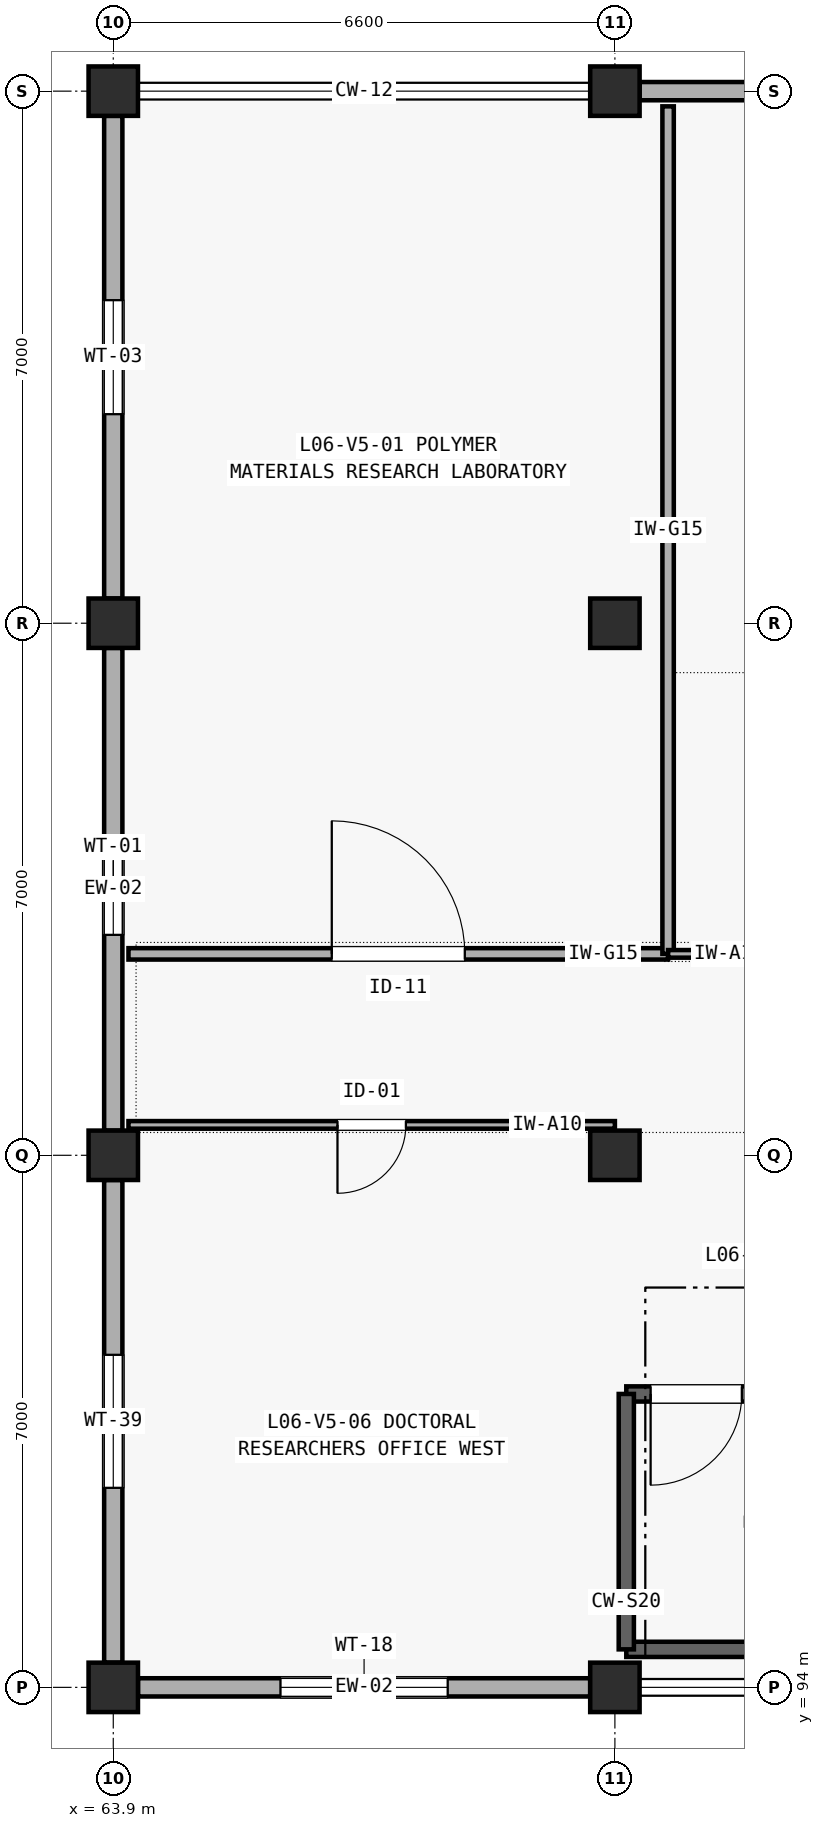
"""IFC4 building model, lengths in metres.
Left out: names, types, materials, properties, quantities, classifications, styles, units other than length and angle.
Written with IfcOpenShell. Run it as: python <this file> out.ifc"""

import sys

from ifc_helpers import new_model, si_unit, direction, frame, frame_2d, origin, origin_2d, place, context, subcontext, project, spatial, rectangle, extrude, element, fill, save


model = new_model("IFC4")
c1 = context("Model", 3, precision=1e-05, world=origin(), true_north=direction((0.0, 1.0)))
c2 = subcontext(c1, "Body", "Model", "MODEL_VIEW")
j1 = project(units=[si_unit("LENGTHUNIT", "METRE"), si_unit("PLANEANGLEUNIT", "RADIAN")], contexts=[c1])
p1 = place(None, origin())
s1 = spatial("IfcSite", under=j1, at=p1, CompositionType="ELEMENT")
p2 = place(p1, origin())
s2 = spatial("IfcBuilding", under=s1, at=p2, CompositionType="ELEMENT")
p3 = place(p2, frame((0.0, 0.0, 25.2)))
s3 = spatial("IfcBuildingStorey", under=s2, at=p3, CompositionType="ELEMENT", Elevation=25.2)
for number, where, z_axis, x_axis in (
    (1, (63.9, 94.0, 0.0), (0.0, 0.0, 1.0), (1.0, 0.0, 0.0)),
    (2, (63.9, 101.0, 0.0), (0.0, 0.0, 1.0), (1.0, 0.0, 0.0)),
    (3, (63.9, 108.0, 0.0), (0.0, 0.0, 1.0), (1.0, 0.0, 0.0)),
    (4, (63.9, 115.0, 0.0), (0.0, 0.0, 1.0), (1.0, 0.0, 0.0)),
    (5, (70.5, 94.0, 0.0), (0.0, 0.0, 1.0), (1.0, 0.0, 0.0)),
    (6, (70.5, 101.0, 0.0), (0.0, 0.0, 1.0), (1.0, 0.0, 0.0)),
    (7, (70.5, 108.0, 0.0), (0.0, 0.0, 1.0), (1.0, 0.0, 0.0)),
    (8, (70.5, 115.0, 0.0), (0.0, 0.0, 1.0), (1.0, 0.0, 0.0)),
):
    element("IfcColumn", number, at=place(p3, frame(where, z_axis=z_axis, x_axis=x_axis)), inside=s3, PredefinedType="COLUMN", context=c2, shape_type="SweptSolid", body=[
        extrude(rectangle(XDim=0.65, YDim=0.65, at=origin_2d()), origin(), (0.0, 0.0, 1.0), 4.2),
    ])
p4 = place(p3, frame((64.225, 94.0, 0.0), z_axis=(0.0, 0.0, 1.0), x_axis=(1.0, 0.0, 0.0)))
e9 = element("IfcWall", 9, at=p4, inside=s3, PredefinedType="SOLIDWALL", context=c2, shape_type="SweptSolid", body=[
    extrude(rectangle(XDim=5.95, YDim=0.24, at=frame_2d((2.975, 0.0))), origin(), (0.0, 0.0, 1.0), 3.345),
])
p5 = place(p4, frame((1.875, 0.0, 0.85)))
e10 = element("IfcOpeningElement", 10, at=p5, cuts=e9, PredefinedType="OPENING", context=c2, shape_type="SweptSolid", body=[
    extrude(rectangle(XDim=2.2, YDim=1.25, at=frame_2d((1.1, 0.625))), frame((0.0, 0.13, 0.0), z_axis=(0.0, -1.0, 0.0), x_axis=(1.0, 0.0, 0.0)), (0.0, 0.0, 1.0), 0.26),
])
p6 = place(p3, frame((70.825, 115.0, 0.0), z_axis=(0.0, 0.0, 1.0), x_axis=(1.0, 0.0, 0.0)))
e11 = element("IfcWall", 11, at=p6, inside=s3, PredefinedType="SOLIDWALL", context=c2, shape_type="SweptSolid", body=[
    extrude(rectangle(XDim=5.95, YDim=0.24, at=frame_2d((2.975, 0.0))), origin(), (0.0, 0.0, 1.0), 3.345),
])
p7 = place(p6, frame((2.025, 0.0, 0.85)))
e12 = element("IfcOpeningElement", 12, at=p7, cuts=e11, PredefinedType="OPENING", context=c2, shape_type="SweptSolid", body=[
    extrude(rectangle(XDim=1.9, YDim=1.45, at=frame_2d((0.95, 0.725))), frame((0.0, 0.13, 0.0), z_axis=(0.0, -1.0, 0.0), x_axis=(1.0, 0.0, 0.0)), (0.0, 0.0, 1.0), 0.26),
])
p8 = place(p3, frame((63.9, 94.325, 0.0), z_axis=(0.0, 0.0, 1.0), x_axis=(0.0, 1.0, 0.0)))
e13 = element("IfcWall", 13, at=p8, inside=s3, PredefinedType="SOLIDWALL", context=c2, shape_type="SweptSolid", body=[
    extrude(rectangle(XDim=6.35, YDim=0.24, at=frame_2d((3.175, 0.0))), origin(), (0.0, 0.0, 1.0), 3.465),
])
p9 = place(p8, frame((2.3, 0.0, 0.85)))
e14 = element("IfcOpeningElement", 14, at=p9, cuts=e13, PredefinedType="OPENING", context=c2, shape_type="SweptSolid", body=[
    extrude(rectangle(XDim=1.75, YDim=1.55, at=frame_2d((0.875, 0.775))), frame((0.0, 0.13, 0.0), z_axis=(0.0, -1.0, 0.0), x_axis=(1.0, 0.0, 0.0)), (0.0, 0.0, 1.0), 0.26),
])
p10 = place(p3, frame((63.9, 101.325, 0.0), z_axis=(0.0, 0.0, 1.0), x_axis=(0.0, 1.0, 0.0)))
e15 = element("IfcWall", 15, at=p10, inside=s3, PredefinedType="SOLIDWALL", context=c2, shape_type="SweptSolid", body=[
    extrude(rectangle(XDim=6.35, YDim=0.24, at=frame_2d((3.175, 0.0))), origin(), (0.0, 0.0, 1.0), 3.465),
])
p11 = place(p10, frame((2.575, 0.0, 0.85)))
e16 = element("IfcOpeningElement", 16, at=p11, cuts=e15, PredefinedType="OPENING", context=c2, shape_type="SweptSolid", body=[
    extrude(rectangle(XDim=1.2, YDim=1.35, at=frame_2d((0.6, 0.675))), frame((0.0, 0.13, 0.0), z_axis=(0.0, -1.0, 0.0), x_axis=(1.0, 0.0, 0.0)), (0.0, 0.0, 1.0), 0.26),
])
p12 = place(p3, frame((63.9, 108.325, 0.0), z_axis=(0.0, 0.0, 1.0), x_axis=(0.0, 1.0, 0.0)))
e17 = element("IfcWall", 17, at=p12, inside=s3, PredefinedType="SOLIDWALL", context=c2, shape_type="SweptSolid", body=[
    extrude(rectangle(XDim=6.35, YDim=0.24, at=frame_2d((3.175, 0.0))), origin(), (0.0, 0.0, 1.0), 3.465),
])
p13 = place(p12, frame((2.425, 0.0, 0.85)))
e18 = element("IfcOpeningElement", 18, at=p13, cuts=e17, PredefinedType="OPENING", context=c2, shape_type="SweptSolid", body=[
    extrude(rectangle(XDim=1.5, YDim=1.35, at=frame_2d((0.75, 0.675))), frame((0.0, 0.13, 0.0), z_axis=(0.0, -1.0, 0.0), x_axis=(1.0, 0.0, 0.0)), (0.0, 0.0, 1.0), 0.26),
])
p14 = place(p3, frame((70.65, 94.5, 0.0), z_axis=(0.0, 0.0, 1.0), x_axis=(1.0, 0.0, 0.0)))
e19 = element("IfcWall", 19, at=p14, inside=s3, PredefinedType="SHEAR", context=c2, shape_type="SweptSolid", body=[
    extrude(rectangle(XDim=6.3, YDim=0.2, at=frame_2d((3.15, 0.0))), origin(), (0.0, 0.0, 1.0), 4.2),
])
p15 = place(p3, frame((70.65, 97.86, 0.0), z_axis=(0.0, 0.0, 1.0), x_axis=(1.0, 0.0, 0.0)))
e20 = element("IfcWall", 20, at=p15, inside=s3, PredefinedType="SHEAR", context=c2, shape_type="SweptSolid", body=[
    extrude(rectangle(XDim=6.3, YDim=0.2, at=frame_2d((3.15, 0.0))), origin(), (0.0, 0.0, 1.0), 4.2),
])
p16 = place(p15, frame((0.32, 0.0, 0.0)))
e21 = element("IfcOpeningElement", 21, at=p16, cuts=e20, PredefinedType="OPENING", context=c2, shape_type="SweptSolid", body=[
    extrude(rectangle(XDim=1.2, YDim=2.15, at=frame_2d((0.6, 1.075))), frame((0.0, 0.11, 0.0), z_axis=(0.0, -1.0, 0.0), x_axis=(1.0, 0.0, 0.0)), (0.0, 0.0, 1.0), 0.22),
])
p17 = place(p3, frame((70.65, 94.5, 0.0), z_axis=(0.0, 0.0, 1.0), x_axis=(0.0, 1.0, 0.0)))
e22 = element("IfcWall", 22, at=p17, inside=s3, PredefinedType="SHEAR", context=c2, shape_type="SweptSolid", body=[
    extrude(rectangle(XDim=3.36, YDim=0.2, at=frame_2d((1.68, 0.0))), origin(), (0.0, 0.0, 1.0), 4.2),
])
p18 = place(p3, frame((64.1, 103.65, 0.0), z_axis=(0.0, 0.0, 1.0), x_axis=(1.0, 0.0, 0.0)))
e23 = element("IfcWall", 23, at=p18, inside=s3, PredefinedType="PARTITIONING", context=c2, shape_type="SweptSolid", body=[
    extrude(rectangle(XDim=7.1, YDim=0.15, at=frame_2d((3.55, 0.0))), origin(), (0.0, 0.0, 1.0), 3.9),
])
p19 = place(p18, frame((2.675, 0.0, 0.0)))
e24 = element("IfcOpeningElement", 24, at=p19, cuts=e23, PredefinedType="OPENING", context=c2, shape_type="SweptSolid", body=[
    extrude(rectangle(XDim=1.75, YDim=2.25, at=frame_2d((0.875, 1.125))), frame((0.0, 0.085, 0.0), z_axis=(0.0, -1.0, 0.0), x_axis=(1.0, 0.0, 0.0)), (0.0, 0.0, 1.0), 0.17),
])
p20 = place(p3, frame((71.2, 103.65, 0.0), z_axis=(0.0, 0.0, 1.0), x_axis=(0.0, 1.0, 0.0)))
e25 = element("IfcWall", 25, at=p20, inside=s3, PredefinedType="PARTITIONING", context=c2, shape_type="SweptSolid", body=[
    extrude(rectangle(XDim=11.15, YDim=0.15, at=frame_2d((5.575, 0.0))), origin(), (0.0, 0.0, 1.0), 3.9),
])
p21 = place(p3, frame((71.2, 103.65, 0.0), z_axis=(0.0, 0.0, 1.0), x_axis=(1.0, 0.0, 0.0)))
e26 = element("IfcWall", 26, at=p21, inside=s3, PredefinedType="PARTITIONING", context=c2, shape_type="SweptSolid", body=[
    extrude(rectangle(XDim=7.0, YDim=0.1, at=frame_2d((3.5, 0.0))), origin(), (0.0, 0.0, 1.0), 3.9),
])
p22 = place(p21, frame((2.575, 0.0, 0.0)))
e27 = element("IfcOpeningElement", 27, at=p22, cuts=e26, PredefinedType="OPENING", context=c2, shape_type="SweptSolid", body=[
    extrude(rectangle(XDim=1.85, YDim=2.3, at=frame_2d((0.925, 1.15))), frame((0.0, 0.06, 0.0), z_axis=(0.0, -1.0, 0.0), x_axis=(1.0, 0.0, 0.0)), (0.0, 0.0, 1.0), 0.12),
])
p23 = place(p3, frame((64.1, 101.4, 0.0), z_axis=(0.0, 0.0, 1.0), x_axis=(1.0, 0.0, 0.0)))
e28 = element("IfcWall", 28, at=p23, inside=s3, PredefinedType="PARTITIONING", context=c2, shape_type="SweptSolid", body=[
    extrude(rectangle(XDim=6.4, YDim=0.1, at=frame_2d((3.2, 0.0))), origin(), (0.0, 0.0, 1.0), 3.9),
])
p24 = place(p23, frame((2.75, 0.0, 0.0)))
e29 = element("IfcOpeningElement", 29, at=p24, cuts=e28, PredefinedType="OPENING", context=c2, shape_type="SweptSolid", body=[
    extrude(rectangle(XDim=0.9, YDim=2.1, at=frame_2d((0.45, 1.05))), frame((0.0, 0.06, 0.0), z_axis=(0.0, -1.0, 0.0), x_axis=(1.0, 0.0, 0.0)), (0.0, 0.0, 1.0), 0.12),
])
p25 = place(p5, origin())
e30 = element("IfcWindow", 30, at=p25, inside=s3, PartitioningType="SINGLE_PANEL", PredefinedType="WINDOW", context=c2, shape_type="SweptSolid", body=[
    extrude(rectangle(XDim=2.2, YDim=1.25, at=frame_2d((1.1, 0.625))), frame((0.0, 0.03, 0.0), z_axis=(0.0, -1.0, 0.0), x_axis=(1.0, 0.0, 0.0)), (0.0, 0.0, 1.0), 0.06),
])
fill(e10, e30)
p26 = place(p9, origin())
e31 = element("IfcWindow", 31, at=p26, inside=s3, PartitioningType="SINGLE_PANEL", PredefinedType="WINDOW", context=c2, shape_type="SweptSolid", body=[
    extrude(rectangle(XDim=1.75, YDim=1.55, at=frame_2d((0.875, 0.775))), frame((0.0, 0.03, 0.0), z_axis=(0.0, -1.0, 0.0), x_axis=(1.0, 0.0, 0.0)), (0.0, 0.0, 1.0), 0.06),
])
fill(e14, e31)
p27 = place(p11, origin())
e32 = element("IfcWindow", 32, at=p27, inside=s3, PartitioningType="SINGLE_PANEL", PredefinedType="WINDOW", context=c2, shape_type="SweptSolid", body=[
    extrude(rectangle(XDim=1.2, YDim=1.35, at=frame_2d((0.6, 0.675))), frame((0.0, 0.03, 0.0), z_axis=(0.0, -1.0, 0.0), x_axis=(1.0, 0.0, 0.0)), (0.0, 0.0, 1.0), 0.06),
])
fill(e16, e32)
p28 = place(p13, origin())
e33 = element("IfcWindow", 33, at=p28, inside=s3, PartitioningType="SINGLE_PANEL", PredefinedType="WINDOW", context=c2, shape_type="SweptSolid", body=[
    extrude(rectangle(XDim=1.5, YDim=1.35, at=frame_2d((0.75, 0.675))), frame((0.0, 0.03, 0.0), z_axis=(0.0, -1.0, 0.0), x_axis=(1.0, 0.0, 0.0)), (0.0, 0.0, 1.0), 0.06),
])
fill(e18, e33)
p29 = place(p16, frame((1.2, 0.0, 0.0), z_axis=(0.0, 0.0, 1.0), x_axis=(-1.0, 0.0, 0.0)))
e34 = element("IfcDoor", 34, at=p29, inside=s3, OperationType="SINGLE_SWING_RIGHT", PredefinedType="DOOR", context=c2, shape_type="SweptSolid", body=[
    extrude(rectangle(XDim=1.2, YDim=2.15, at=frame_2d((0.6, 1.075))), frame((0.0, 0.025, 0.0), z_axis=(0.0, -1.0, 0.0), x_axis=(1.0, 0.0, 0.0)), (0.0, 0.0, 1.0), 0.05),
])
fill(e21, e34)
p30 = place(p19, origin())
e35 = element("IfcDoor", 35, at=p30, inside=s3, OperationType="SINGLE_SWING_LEFT", PredefinedType="DOOR", context=c2, shape_type="SweptSolid", body=[
    extrude(rectangle(XDim=1.75, YDim=2.25, at=frame_2d((0.875, 1.125))), frame((0.0, 0.025, 0.0), z_axis=(0.0, -1.0, 0.0), x_axis=(1.0, 0.0, 0.0)), (0.0, 0.0, 1.0), 0.05),
])
fill(e24, e35)
p31 = place(p24, frame((0.9, 0.0, 0.0), z_axis=(0.0, 0.0, 1.0), x_axis=(-1.0, 0.0, 0.0)))
e36 = element("IfcDoor", 36, at=p31, inside=s3, OperationType="SINGLE_SWING_RIGHT", PredefinedType="DOOR", context=c2, shape_type="SweptSolid", body=[
    extrude(rectangle(XDim=0.9, YDim=2.1, at=frame_2d((0.45, 1.05))), frame((0.0, 0.025, 0.0), z_axis=(0.0, -1.0, 0.0), x_axis=(1.0, 0.0, 0.0)), (0.0, 0.0, 1.0), 0.05),
])
fill(e29, e36)
save(model, sys.argv[1])
